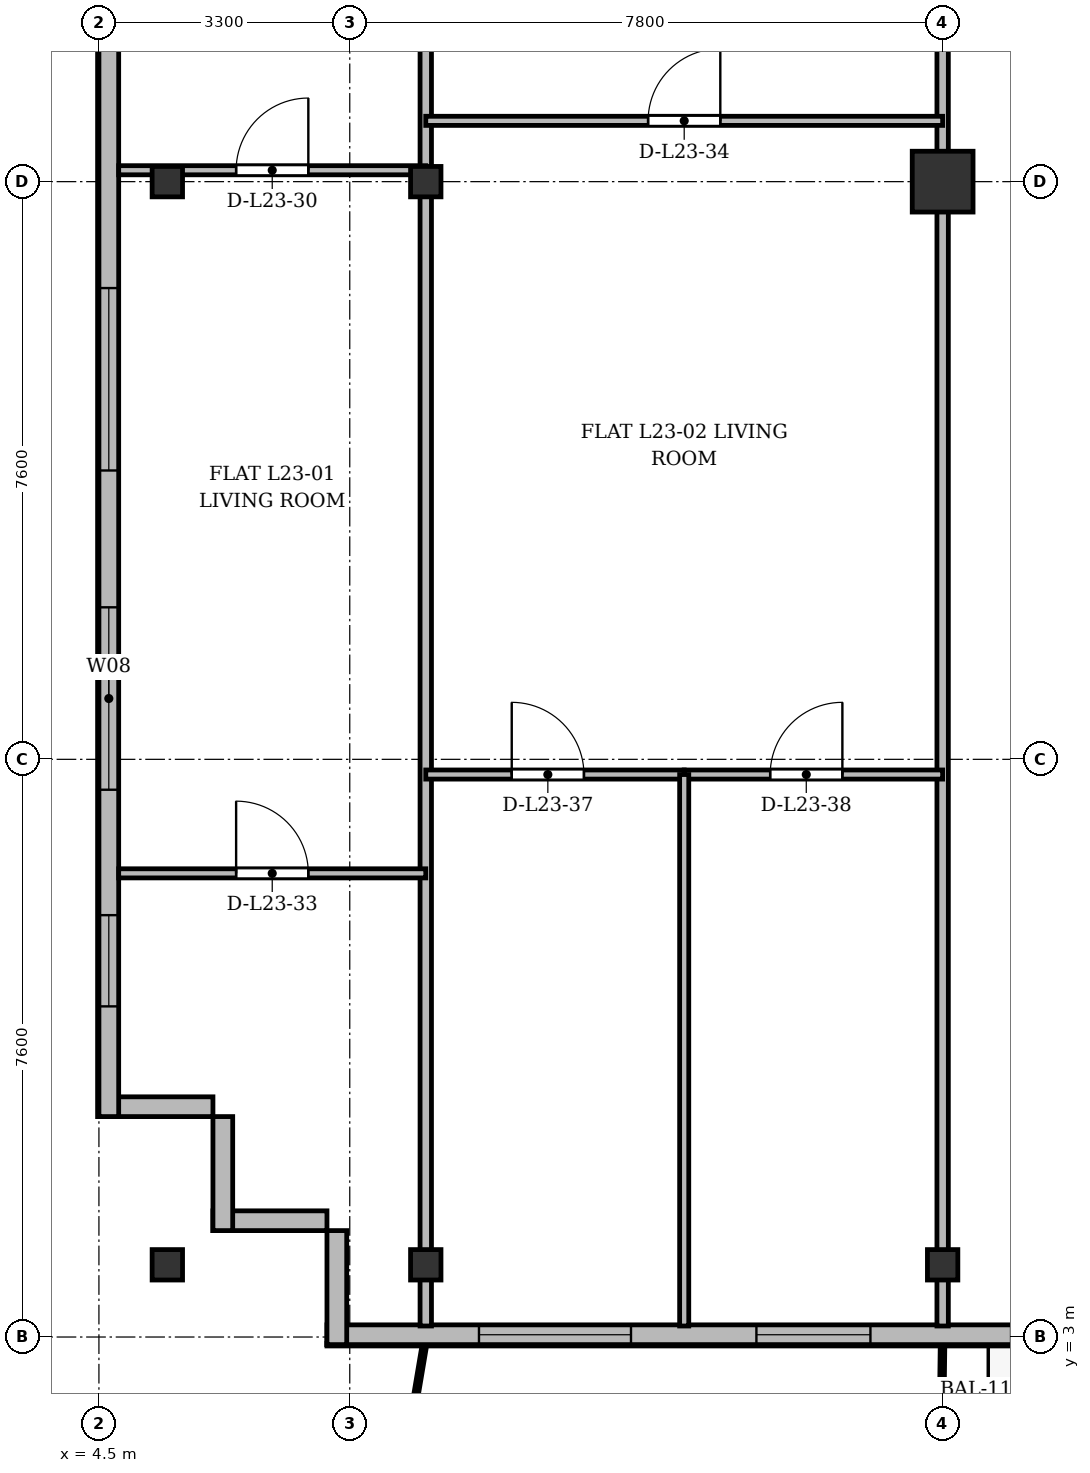
"""IFC4 building model, lengths in metres.
Left out: names, types, materials, properties, quantities, classifications, styles, units other than length and angle.
Written with IfcOpenShell. Run it as: python <this file> out.ifc"""

import sys

from ifc_helpers import new_model, si_unit, direction, frame, frame_2d, origin, origin_2d, place, context, subcontext, project, spatial, rectangle, i_section, extrude, source, transform, mapped, element, fill, save


model = new_model("IFC4")
c1 = context("Model", 3, precision=1e-05, world=origin(), true_north=direction((0.0, 1.0)))
c2 = subcontext(c1, "Body", "Model", "MODEL_VIEW")
j1 = project(units=[si_unit("LENGTHUNIT", "METRE"), si_unit("PLANEANGLEUNIT", "RADIAN")], contexts=[c1])
p1 = place(None, origin())
s1 = spatial("IfcSite", under=j1, at=p1, CompositionType="ELEMENT")
p2 = place(p1, origin())
s2 = spatial("IfcBuilding", under=s1, at=p2, CompositionType="ELEMENT")
p3 = place(p2, frame((0.0, 0.0, 92.5)))
s3 = spatial("IfcBuildingStorey", under=s2, at=p3, CompositionType="ELEMENT", Elevation=92.5)
m1 = source(origin(), c2, "Body", "SweptSolid", [
    extrude(i_section(OverallWidth=0.4, OverallDepth=0.4, WebThickness=0.022, FlangeThickness=0.035, at=origin_2d()), origin(), (0.0, 0.0, 1.0), 3.6),
])
for number, where, z_axis, x_axis in (
    (1, (5.4, 3.95, 0.0), (0.0, 0.0, 1.0), (1.0, 0.0, 0.0)),
    (2, (5.4, 18.2, 0.0), (0.0, 0.0, 1.0), (1.0, 0.0, 0.0)),
    (3, (8.8, 3.95, 0.0), (0.0, 0.0, 1.0), (1.0, 0.0, 0.0)),
    (4, (8.8, 18.2, 0.0), (0.0, 0.0, 1.0), (1.0, 0.0, 0.0)),
    (5, (15.6, 3.95, 0.0), (0.0, 0.0, 1.0), (1.0, 0.0, 0.0)),
):
    element("IfcColumn", number, at=place(p3, frame(where, z_axis=z_axis, x_axis=x_axis)), inside=s3, PredefinedType="COLUMN", context=c2, shape_type="MappedRepresentation", body=[
        mapped(m1, transform((0.0, 0.0, 0.0), x_axis=(1.0, 0.0, 0.0), y_axis=(0.0, 1.0, 0.0), z_axis=(0.0, 0.0, 1.0), scale=1.0)),
    ])
m2 = source(origin(), c2, "Body", "SweptSolid", [
    extrude(rectangle(XDim=0.8, YDim=0.8, at=origin_2d()), origin(), (0.0, 0.0, 1.0), 3.6),
])
p4 = place(p3, frame((15.6, 18.2, 0.0), z_axis=(0.0, 0.0, 1.0), x_axis=(1.0, 0.0, 0.0)))
e6 = element("IfcColumn", 6, at=p4, inside=s3, PredefinedType="COLUMN", context=c2, shape_type="MappedRepresentation", body=[
    mapped(m2, transform((0.0, 0.0, 0.0), x_axis=(1.0, 0.0, 0.0), y_axis=(0.0, 1.0, 0.0), z_axis=(0.0, 0.0, 1.0), scale=1.0)),
])
for number, where, z_axis, x_axis in (
    (7, (7.5, 4.53, 0.0), (0.0, 0.0, 1.0), (-1.0, 0.0, 0.0)),
    (8, (6.13, 4.4, 0.0), (0.0, 0.0, 1.0), (0.0, 1.0, 0.0)),
):
    element("IfcWall", number, at=place(p3, frame(where, z_axis=z_axis, x_axis=x_axis)), inside=s3, PredefinedType="SOLIDWALL", context=c2, shape_type="SweptSolid", body=[
        extrude(rectangle(XDim=1.5, YDim=0.26, at=frame_2d((0.75, 0.0))), origin(), (0.0, 0.0, 1.0), 3.34),
    ])
p5 = place(p3, frame((6.0, 6.03, 0.0), z_axis=(0.0, 0.0, 1.0), x_axis=(-1.0, 0.0, 0.0)))
e9 = element("IfcWall", 9, at=p5, inside=s3, PredefinedType="SOLIDWALL", context=c2, shape_type="SweptSolid", body=[
    extrude(rectangle(XDim=1.5, YDim=0.26, at=frame_2d((0.75, 0.0))), origin(), (0.0, 0.0, 1.0), 2.84),
])
p6 = place(p3, frame((4.63, 5.9, 0.0), z_axis=(0.0, 0.0, 1.0), x_axis=(0.0, 1.0, 0.0)))
e10 = element("IfcWall", 10, at=p6, inside=s3, PredefinedType="SOLIDWALL", context=c2, shape_type="SweptSolid", body=[
    extrude(rectangle(XDim=39.6, YDim=0.26, at=frame_2d((19.8, 0.0))), origin(), (0.0, 0.0, 1.0), 3.34),
])
p7 = place(p6, frame((1.45, 0.0, 0.92)))
e11 = element("IfcOpeningElement", 11, at=p7, cuts=e10, PredefinedType="OPENING", context=c2, shape_type="SweptSolid", body=[
    extrude(rectangle(XDim=1.2, YDim=1.65, at=frame_2d((0.6, 0.825))), frame((0.0, 0.14, 0.0), z_axis=(0.0, -1.0, 0.0), x_axis=(1.0, 0.0, 0.0)), (0.0, 0.0, 1.0), 0.28),
])
p8 = place(p6, frame((4.3, 0.0, 0.92)))
e12 = element("IfcOpeningElement", 12, at=p8, cuts=e10, PredefinedType="OPENING", context=c2, shape_type="SweptSolid", body=[
    extrude(rectangle(XDim=2.4, YDim=2.1, at=frame_2d((1.2, 1.05))), frame((0.0, 0.14, 0.0), z_axis=(0.0, -1.0, 0.0), x_axis=(1.0, 0.0, 0.0)), (0.0, 0.0, 1.0), 0.28),
])
p9 = place(p6, frame((8.5, 0.0, 0.92)))
e13 = element("IfcOpeningElement", 13, at=p9, cuts=e10, PredefinedType="OPENING", context=c2, shape_type="SweptSolid", body=[
    extrude(rectangle(XDim=2.4, YDim=2.1, at=frame_2d((1.2, 1.05))), frame((0.0, 0.14, 0.0), z_axis=(0.0, -1.0, 0.0), x_axis=(1.0, 0.0, 0.0)), (0.0, 0.0, 1.0), 0.28),
])
p10 = place(p6, frame((33.9, 0.0, 0.92)))
e14 = element("IfcOpeningElement", 14, at=p10, cuts=e10, PredefinedType="OPENING", context=c2, shape_type="SweptSolid", body=[
    extrude(rectangle(XDim=1.2, YDim=1.65, at=frame_2d((0.6, 0.825))), frame((0.0, 0.14, 0.0), z_axis=(0.0, -1.0, 0.0), x_axis=(1.0, 0.0, 0.0)), (0.0, 0.0, 1.0), 0.28),
])
p11 = place(p6, frame((37.25, 0.0, 0.92)))
e15 = element("IfcOpeningElement", 15, at=p11, cuts=e10, PredefinedType="OPENING", context=c2, shape_type="SweptSolid", body=[
    extrude(rectangle(XDim=1.2, YDim=1.65, at=frame_2d((0.6, 0.825))), frame((0.0, 0.14, 0.0), z_axis=(0.0, -1.0, 0.0), x_axis=(1.0, 0.0, 0.0)), (0.0, 0.0, 1.0), 0.28),
])
p12 = place(p3, frame((66.9, 3.03, 0.0), z_axis=(0.0, 0.0, 1.0), x_axis=(-1.0, 0.0, 0.0)))
e16 = element("IfcWall", 16, at=p12, inside=s3, PredefinedType="SOLIDWALL", context=c2, shape_type="SweptSolid", body=[
    extrude(rectangle(XDim=59.4, YDim=0.26, at=frame_2d((29.7, 0.0))), origin(), (0.0, 0.0, 1.0), 3.34),
])
p13 = place(p12, frame((2.175, 0.0, 0.9)))
e17 = element("IfcOpeningElement", 17, at=p13, cuts=e16, PredefinedType="OPENING", context=c2, shape_type="SweptSolid", body=[
    extrude(rectangle(XDim=1.65, YDim=1.85, at=frame_2d((0.825, 0.925))), frame((0.0, 0.14, 0.0), z_axis=(0.0, -1.0, 0.0), x_axis=(1.0, 0.0, 0.0)), (0.0, 0.0, 1.0), 0.28),
])
p14 = place(p12, frame((5.5, 0.0, 0.9)))
e18 = element("IfcOpeningElement", 18, at=p14, cuts=e16, PredefinedType="OPENING", context=c2, shape_type="SweptSolid", body=[
    extrude(rectangle(XDim=1.8, YDim=1.8, at=frame_2d((0.9, 0.9))), frame((0.0, 0.14, 0.0), z_axis=(0.0, -1.0, 0.0), x_axis=(1.0, 0.0, 0.0)), (0.0, 0.0, 1.0), 0.28),
])
p15 = place(p12, frame((8.65, 0.0, 0.9)))
e19 = element("IfcOpeningElement", 19, at=p15, cuts=e16, PredefinedType="OPENING", context=c2, shape_type="SweptSolid", body=[
    extrude(rectangle(XDim=1.5, YDim=1.75, at=frame_2d((0.75, 0.875))), frame((0.0, 0.14, 0.0), z_axis=(0.0, -1.0, 0.0), x_axis=(1.0, 0.0, 0.0)), (0.0, 0.0, 1.0), 0.28),
])
p16 = place(p12, frame((11.25, 0.0, 0.9)))
e20 = element("IfcOpeningElement", 20, at=p16, cuts=e16, PredefinedType="OPENING", context=c2, shape_type="SweptSolid", body=[
    extrude(rectangle(XDim=1.5, YDim=1.75, at=frame_2d((0.75, 0.875))), frame((0.0, 0.14, 0.0), z_axis=(0.0, -1.0, 0.0), x_axis=(1.0, 0.0, 0.0)), (0.0, 0.0, 1.0), 0.28),
])
p17 = place(p12, frame((13.6, 0.0, 0.9)))
e21 = element("IfcOpeningElement", 21, at=p17, cuts=e16, PredefinedType="OPENING", context=c2, shape_type="SweptSolid", body=[
    extrude(rectangle(XDim=2.0, YDim=1.95, at=frame_2d((1.0, 0.975))), frame((0.0, 0.14, 0.0), z_axis=(0.0, -1.0, 0.0), x_axis=(1.0, 0.0, 0.0)), (0.0, 0.0, 1.0), 0.28),
])
p18 = place(p12, frame((16.775, 0.0, 0.9)))
e22 = element("IfcOpeningElement", 22, at=p18, cuts=e16, PredefinedType="OPENING", context=c2, shape_type="SweptSolid", body=[
    extrude(rectangle(XDim=1.65, YDim=1.85, at=frame_2d((0.825, 0.925))), frame((0.0, 0.14, 0.0), z_axis=(0.0, -1.0, 0.0), x_axis=(1.0, 0.0, 0.0)), (0.0, 0.0, 1.0), 0.28),
])
p19 = place(p12, frame((20.227, 0.0, 0.0)))
e23 = element("IfcOpeningElement", 23, at=p19, cuts=e16, PredefinedType="OPENING", context=c2, shape_type="SweptSolid", body=[
    extrude(rectangle(XDim=1.2, YDim=2.2, at=frame_2d((0.6, 1.1))), frame((0.0, 0.14, 0.0), z_axis=(0.0, -1.0, 0.0), x_axis=(1.0, 0.0, 0.0)), (0.0, 0.0, 1.0), 0.28),
])
p20 = place(p12, frame((28.6, 0.0, 0.9)))
e24 = element("IfcOpeningElement", 24, at=p20, cuts=e16, PredefinedType="OPENING", context=c2, shape_type="SweptSolid", body=[
    extrude(rectangle(XDim=2.2, YDim=1.8, at=frame_2d((1.1, 0.9))), frame((0.0, 0.14, 0.0), z_axis=(0.0, -1.0, 0.0), x_axis=(1.0, 0.0, 0.0)), (0.0, 0.0, 1.0), 0.28),
])
p21 = place(p12, frame((36.75, 0.0, 0.9)))
e25 = element("IfcOpeningElement", 25, at=p21, cuts=e16, PredefinedType="OPENING", context=c2, shape_type="SweptSolid", body=[
    extrude(rectangle(XDim=1.5, YDim=1.75, at=frame_2d((0.75, 0.875))), frame((0.0, 0.14, 0.0), z_axis=(0.0, -1.0, 0.0), x_axis=(1.0, 0.0, 0.0)), (0.0, 0.0, 1.0), 0.28),
])
p22 = place(p12, frame((39.15, 0.0, 0.9)))
e26 = element("IfcOpeningElement", 26, at=p22, cuts=e16, PredefinedType="OPENING", context=c2, shape_type="SweptSolid", body=[
    extrude(rectangle(XDim=1.5, YDim=1.75, at=frame_2d((0.75, 0.875))), frame((0.0, 0.14, 0.0), z_axis=(0.0, -1.0, 0.0), x_axis=(1.0, 0.0, 0.0)), (0.0, 0.0, 1.0), 0.28),
])
p23 = place(p12, frame((41.475, 0.0, 0.9)))
e27 = element("IfcOpeningElement", 27, at=p23, cuts=e16, PredefinedType="OPENING", context=c2, shape_type="SweptSolid", body=[
    extrude(rectangle(XDim=1.65, YDim=1.85, at=frame_2d((0.825, 0.925))), frame((0.0, 0.14, 0.0), z_axis=(0.0, -1.0, 0.0), x_axis=(1.0, 0.0, 0.0)), (0.0, 0.0, 1.0), 0.28),
])
p24 = place(p12, frame((45.36, 0.0, 0.0)))
e28 = element("IfcOpeningElement", 28, at=p24, cuts=e16, PredefinedType="OPENING", context=c2, shape_type="SweptSolid", body=[
    extrude(rectangle(XDim=1.2, YDim=2.2, at=frame_2d((0.6, 1.1))), frame((0.0, 0.14, 0.0), z_axis=(0.0, -1.0, 0.0), x_axis=(1.0, 0.0, 0.0)), (0.0, 0.0, 1.0), 0.28),
])
p25 = place(p12, frame((48.2, 0.0, 0.9)))
e29 = element("IfcOpeningElement", 29, at=p25, cuts=e16, PredefinedType="OPENING", context=c2, shape_type="SweptSolid", body=[
    extrude(rectangle(XDim=2.2, YDim=1.8, at=frame_2d((1.1, 0.9))), frame((0.0, 0.14, 0.0), z_axis=(0.0, -1.0, 0.0), x_axis=(1.0, 0.0, 0.0)), (0.0, 0.0, 1.0), 0.28),
])
p26 = place(p12, frame((52.25, 0.0, 0.9)))
e30 = element("IfcOpeningElement", 30, at=p26, cuts=e16, PredefinedType="OPENING", context=c2, shape_type="SweptSolid", body=[
    extrude(rectangle(XDim=1.5, YDim=1.75, at=frame_2d((0.75, 0.875))), frame((0.0, 0.14, 0.0), z_axis=(0.0, -1.0, 0.0), x_axis=(1.0, 0.0, 0.0)), (0.0, 0.0, 1.0), 0.28),
])
p27 = place(p12, frame((55.4, 0.0, 0.9)))
e31 = element("IfcOpeningElement", 31, at=p27, cuts=e16, PredefinedType="OPENING", context=c2, shape_type="SweptSolid", body=[
    extrude(rectangle(XDim=2.0, YDim=1.95, at=frame_2d((1.0, 0.975))), frame((0.0, 0.14, 0.0), z_axis=(0.0, -1.0, 0.0), x_axis=(1.0, 0.0, 0.0)), (0.0, 0.0, 1.0), 0.28),
])
p28 = place(p3, frame((7.63, 2.9, 0.0), z_axis=(0.0, 0.0, 1.0), x_axis=(0.0, 1.0, 0.0)))
e32 = element("IfcWall", 32, at=p28, inside=s3, PredefinedType="SOLIDWALL", context=c2, shape_type="SweptSolid", body=[
    extrude(rectangle(XDim=1.5, YDim=0.26, at=frame_2d((0.75, 0.0))), origin(), (0.0, 0.0, 1.0), 2.752),
])
for number, where, z_axis, x_axis in (
    (33, (8.8, 3.145, 0.0), (0.0, 0.0, 1.0), (0.0, 1.0, 0.0)),
    (34, (15.6, 3.145, 0.0), (0.0, 0.0, 1.0), (0.0, 1.0, 0.0)),
):
    element("IfcWall", number, at=place(p3, frame(where, z_axis=z_axis, x_axis=x_axis)), inside=s3, PredefinedType="PARTITIONING", context=c2, shape_type="SweptSolid", body=[
        extrude(rectangle(XDim=24.455, YDim=0.15, at=frame_2d((12.228, 0.0))), origin(), (0.0, 0.0, 1.0), 2.84),
    ])
p29 = place(p3, frame((4.76, 18.35, 0.0), z_axis=(0.0, 0.0, 1.0), x_axis=(1.0, 0.0, 0.0)))
e35 = element("IfcWall", 35, at=p29, inside=s3, PredefinedType="PARTITIONING", context=c2, shape_type="SweptSolid", body=[
    extrude(rectangle(XDim=4.04, YDim=0.12, at=frame_2d((2.02, 0.0))), origin(), (0.0, 0.0, 1.0), 2.752),
])
p30 = place(p29, frame((1.545, 0.0, 0.0)))
e36 = element("IfcOpeningElement", 36, at=p30, cuts=e35, PredefinedType="OPENING", context=c2, shape_type="SweptSolid", body=[
    extrude(rectangle(XDim=0.95, YDim=2.15, at=frame_2d((0.475, 1.075))), frame((0.0, 0.07, 0.0), z_axis=(0.0, -1.0, 0.0), x_axis=(1.0, 0.0, 0.0)), (0.0, 0.0, 1.0), 0.14),
])
p31 = place(p3, frame((4.76, 9.1, 0.0), z_axis=(0.0, 0.0, 1.0), x_axis=(1.0, 0.0, 0.0)))
e37 = element("IfcWall", 37, at=p31, inside=s3, PredefinedType="PARTITIONING", context=c2, shape_type="SweptSolid", body=[
    extrude(rectangle(XDim=4.04, YDim=0.12, at=frame_2d((2.02, 0.0))), origin(), (0.0, 0.0, 1.0), 2.84),
])
p32 = place(p31, frame((1.545, 0.0, 0.0)))
e38 = element("IfcOpeningElement", 38, at=p32, cuts=e37, PredefinedType="OPENING", context=c2, shape_type="SweptSolid", body=[
    extrude(rectangle(XDim=0.95, YDim=2.15, at=frame_2d((0.475, 1.075))), frame((0.0, 0.07, 0.0), z_axis=(0.0, -1.0, 0.0), x_axis=(1.0, 0.0, 0.0)), (0.0, 0.0, 1.0), 0.14),
])
p33 = place(p3, frame((8.8, 19.0, 0.0), z_axis=(0.0, 0.0, 1.0), x_axis=(1.0, 0.0, 0.0)))
e39 = element("IfcWall", 39, at=p33, inside=s3, PredefinedType="PARTITIONING", context=c2, shape_type="SweptSolid", body=[
    extrude(rectangle(XDim=6.8, YDim=0.12, at=frame_2d((3.4, 0.0))), origin(), (0.0, 0.0, 1.0), 2.84),
])
p34 = place(p33, frame((2.925, 0.0, 0.0)))
e40 = element("IfcOpeningElement", 40, at=p34, cuts=e39, PredefinedType="OPENING", context=c2, shape_type="SweptSolid", body=[
    extrude(rectangle(XDim=0.95, YDim=2.15, at=frame_2d((0.475, 1.075))), frame((0.0, 0.07, 0.0), z_axis=(0.0, -1.0, 0.0), x_axis=(1.0, 0.0, 0.0)), (0.0, 0.0, 1.0), 0.14),
])
p35 = place(p3, frame((8.8, 10.4, 0.0), z_axis=(0.0, 0.0, 1.0), x_axis=(1.0, 0.0, 0.0)))
e41 = element("IfcWall", 41, at=p35, inside=s3, PredefinedType="PARTITIONING", context=c2, shape_type="SweptSolid", body=[
    extrude(rectangle(XDim=3.4, YDim=0.12, at=frame_2d((1.7, 0.0))), origin(), (0.0, 0.0, 1.0), 2.84),
])
p36 = place(p35, frame((1.131, 0.0, 0.0)))
e42 = element("IfcOpeningElement", 42, at=p36, cuts=e41, PredefinedType="OPENING", context=c2, shape_type="SweptSolid", body=[
    extrude(rectangle(XDim=0.95, YDim=2.15, at=frame_2d((0.475, 1.075))), frame((0.0, 0.07, 0.0), z_axis=(0.0, -1.0, 0.0), x_axis=(1.0, 0.0, 0.0)), (0.0, 0.0, 1.0), 0.14),
])
p37 = place(p3, frame((12.2, 10.4, 0.0), z_axis=(0.0, 0.0, 1.0), x_axis=(1.0, 0.0, 0.0)))
e43 = element("IfcWall", 43, at=p37, inside=s3, PredefinedType="PARTITIONING", context=c2, shape_type="SweptSolid", body=[
    extrude(rectangle(XDim=3.4, YDim=0.12, at=frame_2d((1.7, 0.0))), origin(), (0.0, 0.0, 1.0), 2.84),
])
p38 = place(p37, frame((1.131, 0.0, 0.0)))
e44 = element("IfcOpeningElement", 44, at=p38, cuts=e43, PredefinedType="OPENING", context=c2, shape_type="SweptSolid", body=[
    extrude(rectangle(XDim=0.95, YDim=2.15, at=frame_2d((0.475, 1.075))), frame((0.0, 0.07, 0.0), z_axis=(0.0, -1.0, 0.0), x_axis=(1.0, 0.0, 0.0)), (0.0, 0.0, 1.0), 0.14),
])
p39 = place(p3, frame((12.2, 3.145, 0.0), z_axis=(0.0, 0.0, 1.0), x_axis=(0.0, 1.0, 0.0)))
e45 = element("IfcWall", 45, at=p39, inside=s3, PredefinedType="PARTITIONING", context=c2, shape_type="SweptSolid", body=[
    extrude(rectangle(XDim=7.255, YDim=0.12, at=frame_2d((3.627, 0.0))), origin(), (0.0, 0.0, 1.0), 2.752),
])
m3 = source(origin(), c2, "Body", "SweptSolid", [
    extrude(rectangle(XDim=1.2, YDim=1.65, at=frame_2d((0.6, 0.825))), frame((0.0, 0.03, 0.0), z_axis=(0.0, -1.0, 0.0), x_axis=(1.0, 0.0, 0.0)), (0.0, 0.0, 1.0), 0.06),
])
p40 = place(p7, origin())
e46 = element("IfcWindow", 46, at=p40, inside=s3, PartitioningType="SINGLE_PANEL", PredefinedType="WINDOW", context=c2, shape_type="MappedRepresentation", body=[
    mapped(m3, transform((0.0, 0.0, 0.0), x_axis=(1.0, 0.0, 0.0), y_axis=(0.0, 1.0, 0.0), z_axis=(0.0, 0.0, 1.0), scale=1.0)),
])
fill(e11, e46)
m4 = source(origin(), c2, "Body", "SweptSolid", [
    extrude(rectangle(XDim=2.4, YDim=2.1, at=frame_2d((1.2, 1.05))), frame((0.0, 0.03, 0.0), z_axis=(0.0, -1.0, 0.0), x_axis=(1.0, 0.0, 0.0)), (0.0, 0.0, 1.0), 0.06),
])
p41 = place(p8, origin())
e47 = element("IfcWindow", 47, at=p41, inside=s3, PartitioningType="SINGLE_PANEL", PredefinedType="WINDOW", context=c2, shape_type="MappedRepresentation", body=[
    mapped(m4, transform((0.0, 0.0, 0.0), x_axis=(1.0, 0.0, 0.0), y_axis=(0.0, 1.0, 0.0), z_axis=(0.0, 0.0, 1.0), scale=1.0)),
])
fill(e12, e47)
p42 = place(p9, origin())
e48 = element("IfcWindow", 48, at=p42, inside=s3, PartitioningType="SINGLE_PANEL", PredefinedType="WINDOW", context=c2, shape_type="MappedRepresentation", body=[
    mapped(m4, transform((0.0, 0.0, 0.0), x_axis=(1.0, 0.0, 0.0), y_axis=(0.0, 1.0, 0.0), z_axis=(0.0, 0.0, 1.0), scale=1.0)),
])
fill(e13, e48)
m5 = source(origin(), c2, "Body", "SweptSolid", [
    extrude(rectangle(XDim=1.5, YDim=1.75, at=frame_2d((0.75, 0.875))), frame((0.0, 0.03, 0.0), z_axis=(0.0, -1.0, 0.0), x_axis=(1.0, 0.0, 0.0)), (0.0, 0.0, 1.0), 0.06),
])
p43 = place(p26, origin())
e49 = element("IfcWindow", 49, at=p43, inside=s3, PartitioningType="SINGLE_PANEL", PredefinedType="WINDOW", context=c2, shape_type="MappedRepresentation", body=[
    mapped(m5, transform((0.0, 0.0, 0.0), x_axis=(1.0, 0.0, 0.0), y_axis=(0.0, 1.0, 0.0), z_axis=(0.0, 0.0, 1.0), scale=1.0)),
])
fill(e30, e49)
m6 = source(origin(), c2, "Body", "SweptSolid", [
    extrude(rectangle(XDim=2.0, YDim=1.95, at=frame_2d((1.0, 0.975))), frame((0.0, 0.03, 0.0), z_axis=(0.0, -1.0, 0.0), x_axis=(1.0, 0.0, 0.0)), (0.0, 0.0, 1.0), 0.06),
])
p44 = place(p27, origin())
e50 = element("IfcWindow", 50, at=p44, inside=s3, PartitioningType="SINGLE_PANEL", PredefinedType="WINDOW", context=c2, shape_type="MappedRepresentation", body=[
    mapped(m6, transform((0.0, 0.0, 0.0), x_axis=(1.0, 0.0, 0.0), y_axis=(0.0, 1.0, 0.0), z_axis=(0.0, 0.0, 1.0), scale=1.0)),
])
fill(e31, e50)
m7 = source(origin(), c2, "Body", "SweptSolid", [
    extrude(rectangle(XDim=0.95, YDim=2.15, at=frame_2d((0.475, 1.075))), frame((0.0, 0.025, 0.0), z_axis=(0.0, -1.0, 0.0), x_axis=(1.0, 0.0, 0.0)), (0.0, 0.0, 1.0), 0.05),
])
p45 = place(p30, origin())
e51 = element("IfcDoor", 51, at=p45, inside=s3, OperationType="SINGLE_SWING_RIGHT", PredefinedType="DOOR", context=c2, shape_type="MappedRepresentation", body=[
    mapped(m7, transform((0.0, 0.0, 0.0), x_axis=(1.0, 0.0, 0.0), y_axis=(0.0, 1.0, 0.0), z_axis=(0.0, 0.0, 1.0), scale=1.0)),
])
fill(e36, e51)
p46 = place(p32, origin())
e52 = element("IfcDoor", 52, at=p46, inside=s3, OperationType="SINGLE_SWING_LEFT", PredefinedType="DOOR", context=c2, shape_type="MappedRepresentation", body=[
    mapped(m7, transform((0.0, 0.0, 0.0), x_axis=(1.0, 0.0, 0.0), y_axis=(0.0, 1.0, 0.0), z_axis=(0.0, 0.0, 1.0), scale=1.0)),
])
fill(e38, e52)
p47 = place(p34, origin())
e53 = element("IfcDoor", 53, at=p47, inside=s3, OperationType="SINGLE_SWING_RIGHT", PredefinedType="DOOR", context=c2, shape_type="MappedRepresentation", body=[
    mapped(m7, transform((0.0, 0.0, 0.0), x_axis=(1.0, 0.0, 0.0), y_axis=(0.0, 1.0, 0.0), z_axis=(0.0, 0.0, 1.0), scale=1.0)),
])
fill(e40, e53)
p48 = place(p36, origin())
e54 = element("IfcDoor", 54, at=p48, inside=s3, OperationType="SINGLE_SWING_LEFT", PredefinedType="DOOR", context=c2, shape_type="MappedRepresentation", body=[
    mapped(m7, transform((0.0, 0.0, 0.0), x_axis=(1.0, 0.0, 0.0), y_axis=(0.0, 1.0, 0.0), z_axis=(0.0, 0.0, 1.0), scale=1.0)),
])
fill(e42, e54)
p49 = place(p38, origin())
e55 = element("IfcDoor", 55, at=p49, inside=s3, OperationType="SINGLE_SWING_RIGHT", PredefinedType="DOOR", context=c2, shape_type="MappedRepresentation", body=[
    mapped(m7, transform((0.0, 0.0, 0.0), x_axis=(1.0, 0.0, 0.0), y_axis=(0.0, 1.0, 0.0), z_axis=(0.0, 0.0, 1.0), scale=1.0)),
])
fill(e44, e55)
save(model, sys.argv[1])
